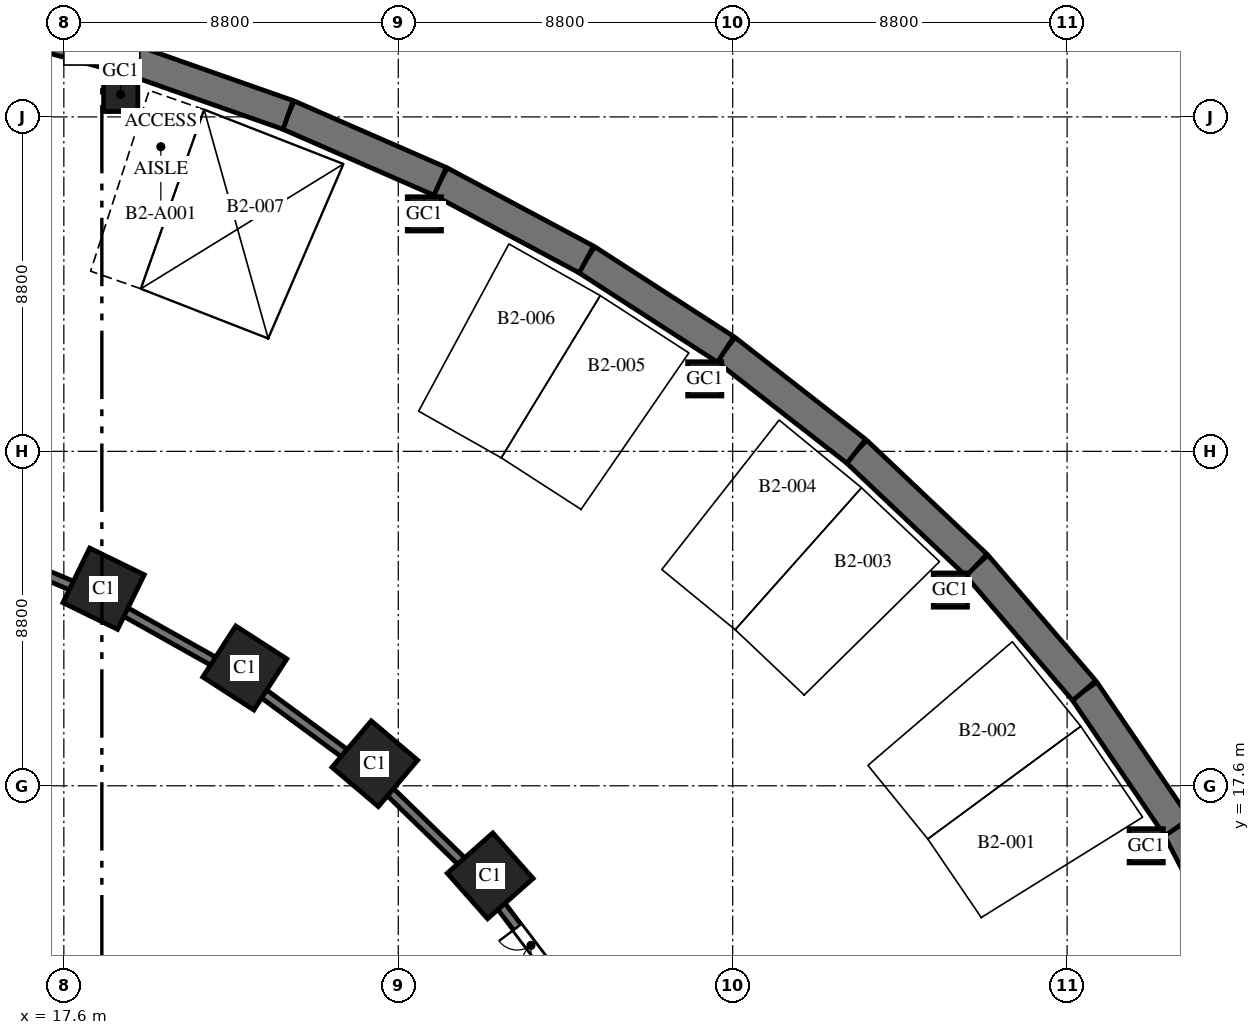
"""IFC4 building model, lengths in metres.
Left out: names, types, materials, properties, quantities, classifications, styles, units other than length and angle.
Written with IfcOpenShell. Run it as: python <this file> out.ifc"""

import sys

from ifc_helpers import new_model, si_unit, direction, frame, frame_2d, origin, origin_2d, place, context, subcontext, project, spatial, rectangle, hollow_rectangle, extrude, element, fill, save


model = new_model("IFC4")
c1 = context("Model", 3, precision=1e-05, world=origin(), true_north=direction((0.0, 1.0)))
c2 = subcontext(c1, "Body", "Model", "MODEL_VIEW")
j1 = project(units=[si_unit("LENGTHUNIT", "METRE"), si_unit("PLANEANGLEUNIT", "RADIAN")], contexts=[c1])
p1 = place(None, origin())
s1 = spatial("IfcSite", under=j1, at=p1, CompositionType="ELEMENT")
p2 = place(p1, origin())
s2 = spatial("IfcBuilding", under=s1, at=p2, CompositionType="ELEMENT")
p3 = place(p2, frame((0.0, 0.0, -8.4)))
s3 = spatial("IfcBuildingStorey", under=s2, at=p3, CompositionType="ELEMENT", Elevation=-8.4)
p4 = place(p3, frame((48.894, 12.649, -0.3), z_axis=(0.0, 0.0, 1.0), x_axis=(-0.459242531468, 0.888310923771, 0.0)))
e1 = element("IfcWall", 1, at=p4, inside=s3, PredefinedType="SOLIDWALL", context=c2, shape_type="SweptSolid", body=[
    extrude(rectangle(XDim=4.345, YDim=0.8, at=frame_2d((2.172, 0.0))), origin(), (0.0, 0.0, 1.0), 4.5),
])
p5 = place(p3, frame((46.899, 16.508, -0.3), z_axis=(0.0, 0.0, 1.0), x_axis=(-0.562667738859, 0.82668314102, 0.0)))
e2 = element("IfcWall", 2, at=p5, inside=s3, PredefinedType="SOLIDWALL", context=c2, shape_type="SweptSolid", body=[
    extrude(rectangle(XDim=4.349, YDim=0.8, at=frame_2d((2.174, 0.0))), origin(), (0.0, 0.0, 1.0), 4.5),
])
p6 = place(p3, frame((44.452, 20.104, -0.3), z_axis=(0.0, 0.0, 1.0), x_axis=(-0.651387059497, 0.758745608699, 0.0)))
e3 = element("IfcWall", 3, at=p6, inside=s3, PredefinedType="SOLIDWALL", context=c2, shape_type="SweptSolid", body=[
    extrude(rectangle(XDim=4.353, YDim=0.8, at=frame_2d((2.176, 0.0))), origin(), (0.0, 0.0, 1.0), 4.5),
])
p7 = place(p3, frame((41.617, 23.406, -0.3), z_axis=(0.0, 0.0, 1.0), x_axis=(-0.72620446032, 0.687478786444, 0.0)))
e4 = element("IfcWall", 4, at=p7, inside=s3, PredefinedType="SOLIDWALL", context=c2, shape_type="SweptSolid", body=[
    extrude(rectangle(XDim=4.356, YDim=0.8, at=frame_2d((2.178, 0.0))), origin(), (0.0, 0.0, 1.0), 4.5),
])
p8 = place(p3, frame((38.453, 26.401, -0.3), z_axis=(0.0, 0.0, 1.0), x_axis=(-0.788491985196, 0.615045030288, 0.0)))
e5 = element("IfcWall", 5, at=p8, inside=s3, PredefinedType="SOLIDWALL", context=c2, shape_type="SweptSolid", body=[
    extrude(rectangle(XDim=4.359, YDim=0.8, at=frame_2d((2.18, 0.0))), origin(), (0.0, 0.0, 1.0), 4.5),
])
p9 = place(p3, frame((35.016, 29.082, -0.3), z_axis=(0.0, 0.0, 1.0), x_axis=(-0.840047348843, 0.542513088969, 0.0)))
e6 = element("IfcWall", 6, at=p9, inside=s3, PredefinedType="SOLIDWALL", context=c2, shape_type="SweptSolid", body=[
    extrude(rectangle(XDim=4.362, YDim=0.8, at=frame_2d((2.181, 0.0))), origin(), (0.0, 0.0, 1.0), 4.5),
])
p10 = place(p3, frame((31.352, 31.448, -0.3), z_axis=(0.0, 0.0, 1.0), x_axis=(-0.882159305704, 0.47095112205, 0.0)))
e7 = element("IfcWall", 7, at=p10, inside=s3, PredefinedType="SOLIDWALL", context=c2, shape_type="SweptSolid", body=[
    extrude(rectangle(XDim=4.365, YDim=0.8, at=frame_2d((2.182, 0.0))), origin(), (0.0, 0.0, 1.0), 4.5),
])
p11 = place(p3, frame((27.501, 33.504, -0.3), z_axis=(0.0, 0.0, 1.0), x_axis=(-0.916336904548, 0.400408138483, 0.0)))
e8 = element("IfcWall", 8, at=p11, inside=s3, PredefinedType="SOLIDWALL", context=c2, shape_type="SweptSolid", body=[
    extrude(rectangle(XDim=4.366, YDim=0.8, at=frame_2d((2.183, 0.0))), origin(), (0.0, 0.0, 1.0), 4.5),
])
p12 = place(p3, frame((23.5, 35.252, -0.3), z_axis=(0.0, 0.0, 1.0), x_axis=(-0.943526738033, 0.331296384853, 0.0)))
e9 = element("IfcWall", 9, at=p12, inside=s3, PredefinedType="SOLIDWALL", context=c2, shape_type="SweptSolid", body=[
    extrude(rectangle(XDim=4.368, YDim=0.8, at=frame_2d((2.184, 0.0))), origin(), (0.0, 0.0, 1.0), 4.5),
])
p13 = place(p3, frame((19.379, 36.699, -0.3), z_axis=(0.0, 0.0, 1.0), x_axis=(-0.964679950239, 0.263424739931, 0.0)))
e10 = element("IfcWall", 10, at=p13, inside=s3, PredefinedType="SOLIDWALL", context=c2, shape_type="SweptSolid", body=[
    extrude(rectangle(XDim=4.369, YDim=0.8, at=frame_2d((2.185, 0.0))), origin(), (0.0, 0.0, 1.0), 4.5),
])
for number, where, z_axis, x_axis in (
    (11, (28.819, 15.23, -0.3), (0.0, 0.0, 1.0), (-0.663, 0.749, 0.0)),
    (12, (25.783, 18.18, -0.3), (0.0, 0.0, 1.0), (-0.763, 0.646, 0.0)),
    (13, (22.362, 20.7, -0.3), (0.0, 0.0, 1.0), (-0.84, 0.542, 0.0)),
    (14, (18.646, 22.785, -0.3), (0.0, 0.0, 1.0), (-0.898, 0.439, 0.0)),
):
    element("IfcColumn", number, at=place(p3, frame(where, z_axis=z_axis, x_axis=x_axis)), inside=s3, PredefinedType="COLUMN", context=c2, shape_type="SweptSolid", body=[
        extrude(rectangle(XDim=1.6, YDim=1.6, at=origin_2d()), origin(), (0.0, 0.0, 1.0), 4.5),
    ])
for number, where, z_axis, x_axis in (
    (15, (46.081, 16.021, -0.3), (0.0, 0.0, 1.0), (1.0, 0.0, 0.0)),
    (16, (40.928, 22.75, -0.3), (0.0, 0.0, 1.0), (1.0, 0.0, 0.0)),
    (17, (34.465, 28.307, -0.3), (0.0, 0.0, 1.0), (1.0, 0.0, 0.0)),
    (18, (27.087, 32.648, -0.3), (0.0, 0.0, 1.0), (1.0, 0.0, 0.0)),
    (19, (19.097, 35.792, -0.3), (0.0, 0.0, 1.0), (1.0, 0.0, 0.0)),
):
    element("IfcColumn", number, at=place(p3, frame(where, z_axis=z_axis, x_axis=x_axis)), inside=s3, PredefinedType="COLUMN", context=c2, shape_type="SweptSolid", body=[
        extrude(hollow_rectangle(XDim=0.9, YDim=0.9, WallThickness=0.045, at=origin_2d()), origin(), (0.0, 0.0, 1.0), 4.5),
    ])
p14 = place(p3, frame((31.148, 11.744, 0.0), z_axis=(0.0, 0.0, 1.0), x_axis=(-0.604041965907, 0.796952510143, 0.0)))
e20 = element("IfcWall", 20, at=p14, inside=s3, PredefinedType="SOLIDWALL", context=c2, shape_type="SweptSolid", body=[
    extrude(rectangle(XDim=4.157, YDim=0.25, at=frame_2d((2.079, 0.0))), origin(), (0.0, 0.0, 1.0), 3.0),
])
p15 = place(p14, frame((1.479, 0.0, 0.0)))
e21 = element("IfcOpeningElement", 21, at=p15, cuts=e20, PredefinedType="OPENING", context=c2, shape_type="SweptSolid", body=[
    extrude(rectangle(XDim=1.2, YDim=2.1, at=frame_2d((0.6, 1.05))), frame((0.0, 0.135, 0.0), z_axis=(0.0, -1.0, 0.0), x_axis=(1.0, 0.0, 0.0)), (0.0, 0.0, 1.0), 0.27),
])
p16 = place(p3, frame((28.625, 15.071, 0.0), z_axis=(0.0, 0.0, 1.0), x_axis=(-0.717227656803, 0.696838925661, 0.0)))
e22 = element("IfcWall", 22, at=p16, inside=s3, PredefinedType="SOLIDWALL", context=c2, shape_type="SweptSolid", body=[
    extrude(rectangle(XDim=4.179, YDim=0.25, at=frame_2d((2.089, 0.0))), origin(), (0.0, 0.0, 1.0), 3.0),
])
p17 = place(p3, frame((25.614, 17.994, 0.0), z_axis=(0.0, 0.0, 1.0), x_axis=(-0.805155221937, 0.593064135306, 0.0)))
e23 = element("IfcWall", 23, at=p17, inside=s3, PredefinedType="SOLIDWALL", context=c2, shape_type="SweptSolid", body=[
    extrude(rectangle(XDim=4.198, YDim=0.25, at=frame_2d((2.099, 0.0))), origin(), (0.0, 0.0, 1.0), 3.0),
])
p18 = place(p3, frame((22.219, 20.494, 0.0), z_axis=(0.0, 0.0, 1.0), x_axis=(-0.872061015455, 0.489397165218, 0.0)))
e24 = element("IfcWall", 24, at=p18, inside=s3, PredefinedType="SOLIDWALL", context=c2, shape_type="SweptSolid", body=[
    extrude(rectangle(XDim=4.213, YDim=0.25, at=frame_2d((2.107, 0.0))), origin(), (0.0, 0.0, 1.0), 3.0),
])
p19 = place(p3, frame((18.528, 22.564, 0.0), z_axis=(0.0, 0.0, 1.0), x_axis=(-0.921810386469, 0.387641085798, 0.0)))
e25 = element("IfcWall", 25, at=p19, inside=s3, PredefinedType="SOLIDWALL", context=c2, shape_type="SweptSolid", body=[
    extrude(rectangle(XDim=4.225, YDim=0.25, at=frame_2d((2.113, 0.0))), origin(), (0.0, 0.0, 1.0), 3.0),
])
p20 = place(p15, origin())
e26 = element("IfcDoor", 26, at=p20, inside=s3, OperationType="DOUBLE_DOOR_SINGLE_SWING", PredefinedType="DOOR", context=c2, shape_type="SweptSolid", body=[
    extrude(rectangle(XDim=1.2, YDim=2.1, at=frame_2d((0.6, 1.05))), frame((0.0, 0.025, 0.0), z_axis=(0.0, -1.0, 0.0), x_axis=(1.0, 0.0, 0.0)), (0.0, 0.0, 1.0), 0.05),
])
fill(e21, e26)
save(model, sys.argv[1])
